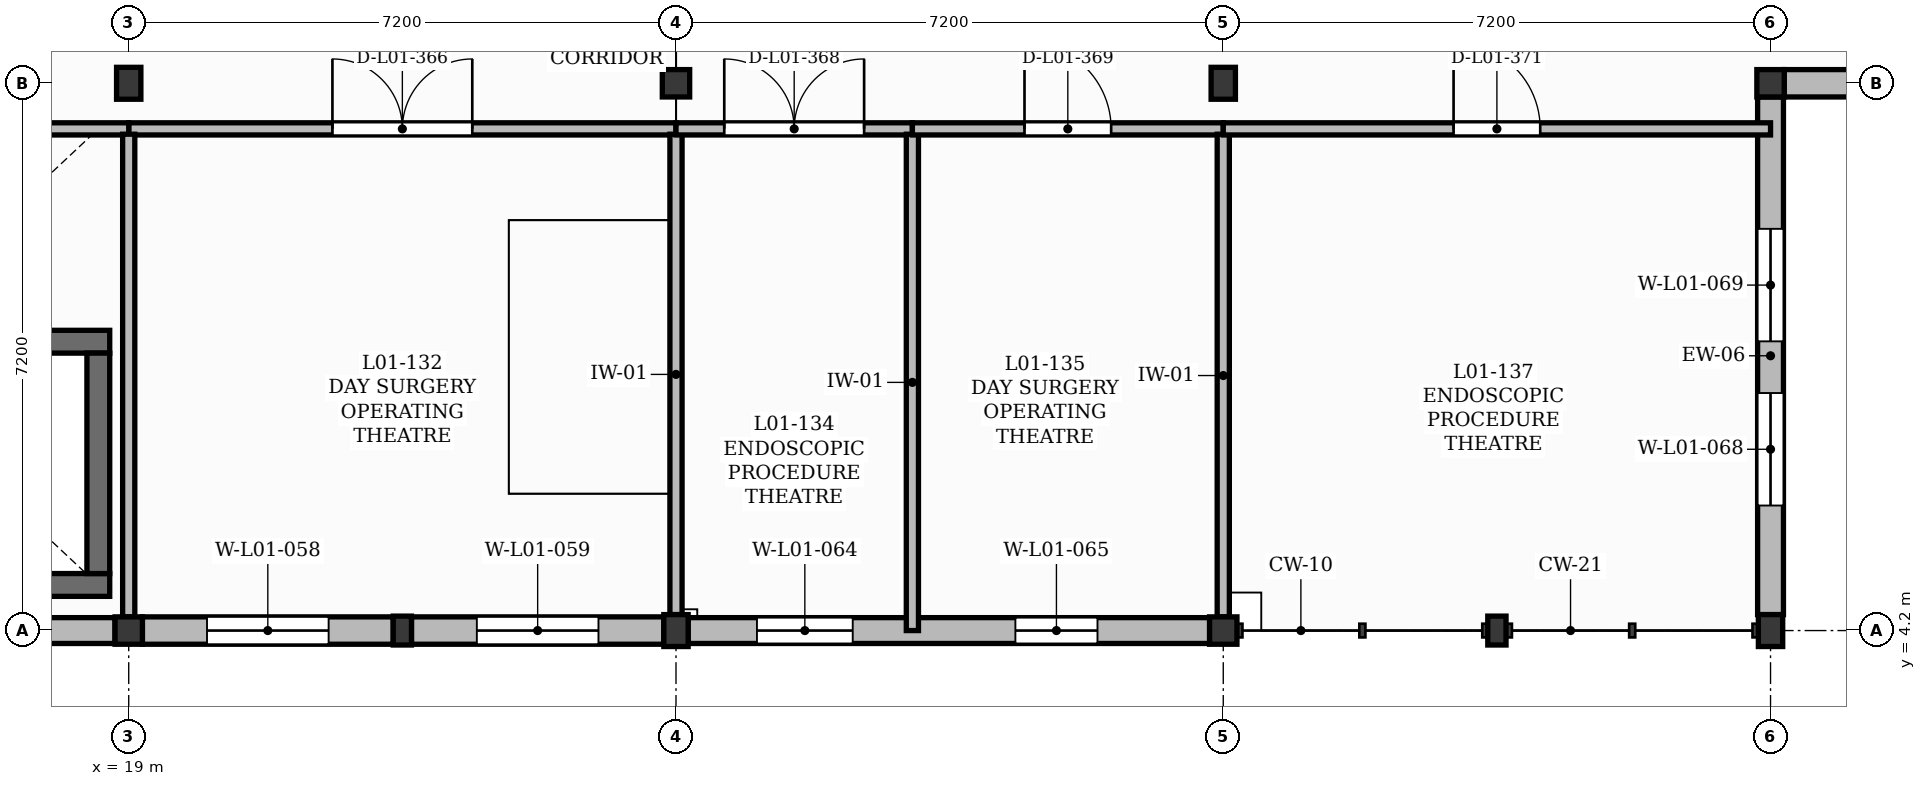
"""IFC4 building model, lengths in metres.
Left out: names, types, materials, properties, quantities, classifications, styles, units other than length and angle.
Written with IfcOpenShell. Run it as: python <this file> out.ifc"""

import sys

from ifc_helpers import new_model, si_unit, direction, frame, frame_2d, origin, origin_2d, place, context, subcontext, project, spatial, rectangle, extrude, element, fill, save


model = new_model("IFC4")
c1 = context("Model", 3, precision=1e-05, world=origin(), true_north=direction((0.0, 1.0)))
c2 = subcontext(c1, "Body", "Model", "MODEL_VIEW")
j1 = project(units=[si_unit("LENGTHUNIT", "METRE"), si_unit("PLANEANGLEUNIT", "RADIAN")], contexts=[c1])
p1 = place(None, origin())
s1 = spatial("IfcSite", under=j1, at=p1, CompositionType="ELEMENT")
p2 = place(p1, origin())
s2 = spatial("IfcBuilding", under=s1, at=p2, CompositionType="ELEMENT")
p3 = place(p2, frame((0.0, 0.0, 4.5)))
s3 = spatial("IfcBuildingStorey", under=s2, at=p3, CompositionType="ELEMENT", Elevation=4.5)
p4 = place(p3, frame((19.0, 4.2, 0.0), z_axis=(0.0, 0.0, 1.0), x_axis=(1.0, 0.0, 0.0)))
e1 = element("IfcColumn", 1, at=p4, inside=s3, PredefinedType="COLUMN", context=c2, shape_type="SweptSolid", body=[
    extrude(rectangle(XDim=0.36, YDim=0.36, at=origin_2d()), origin(), (0.0, 0.0, 1.0), 4.26),
])
for number, where, z_axis, x_axis in (
    (2, (19.0, 11.4, 0.0), (0.0, 0.0, 1.0), (1.0, 0.0, 0.0)),
    (3, (26.2, 4.2, 0.0), (0.0, 0.0, 1.0), (1.0, 0.0, 0.0)),
):
    element("IfcColumn", number, at=place(p3, frame(where, z_axis=z_axis, x_axis=x_axis)), inside=s3, PredefinedType="COLUMN", context=c2, shape_type="SweptSolid", body=[
        extrude(rectangle(XDim=0.32, YDim=0.42, at=origin_2d()), origin(), (0.0, 0.0, 1.0), 4.26),
    ])
for number, where, z_axis, x_axis in (
    (4, (26.2, 11.4, 0.0), (0.0, 0.0, 1.0), (1.0, 0.0, 0.0)),
    (5, (33.4, 4.2, 0.0), (0.0, 0.0, 1.0), (1.0, 0.0, 0.0)),
):
    element("IfcColumn", number, at=place(p3, frame(where, z_axis=z_axis, x_axis=x_axis)), inside=s3, PredefinedType="COLUMN", context=c2, shape_type="SweptSolid", body=[
        extrude(rectangle(XDim=0.36, YDim=0.36, at=origin_2d()), origin(), (0.0, 0.0, 1.0), 4.26),
    ])
for number, where, z_axis, x_axis in (
    (6, (33.4, 11.4, 0.0), (0.0, 0.0, 1.0), (1.0, 0.0, 0.0)),
    (7, (40.6, 4.2, 0.0), (0.0, 0.0, 1.0), (1.0, 0.0, 0.0)),
):
    element("IfcColumn", number, at=place(p3, frame(where, z_axis=z_axis, x_axis=x_axis)), inside=s3, PredefinedType="COLUMN", context=c2, shape_type="SweptSolid", body=[
        extrude(rectangle(XDim=0.32, YDim=0.42, at=origin_2d()), origin(), (0.0, 0.0, 1.0), 4.26),
    ])
p5 = place(p3, frame((40.6, 11.4, 0.0), z_axis=(0.0, 0.0, 1.0), x_axis=(1.0, 0.0, 0.0)))
e8 = element("IfcColumn", 8, at=p5, inside=s3, PredefinedType="COLUMN", context=c2, shape_type="SweptSolid", body=[
    extrude(rectangle(XDim=0.36, YDim=0.36, at=origin_2d()), origin(), (0.0, 0.0, 1.0), 4.26),
])
for number, where, z_axis, x_axis in (
    (9, (22.6, 4.2, 0.0), (0.0, 0.0, 1.0), (1.0, 0.0, 0.0)),
    (10, (37.0, 4.2, 0.0), (0.0, 0.0, 1.0), (1.0, 0.0, 0.0)),
):
    element("IfcColumn", number, at=place(p3, frame(where, z_axis=z_axis, x_axis=x_axis)), inside=s3, PredefinedType="PILASTER", context=c2, shape_type="SweptSolid", body=[
        extrude(rectangle(XDim=0.24, YDim=0.38, at=origin_2d()), origin(), (0.0, 0.0, 1.0), 4.26),
    ])
p6 = place(p3, frame((11.96, 4.2, 0.0), z_axis=(0.0, 0.0, 1.0), x_axis=(1.0, 0.0, 0.0)))
e11 = element("IfcWall", 11, at=p6, inside=s3, PredefinedType="SOLIDWALL", context=c2, shape_type="SweptSolid", body=[
    extrude(rectangle(XDim=6.86, YDim=0.34, at=frame_2d((3.43, 0.0))), origin(), (0.0, 0.0, 1.0), 3.8),
])
p7 = place(p3, frame((19.18, 4.2, 0.0), z_axis=(0.0, 0.0, 1.0), x_axis=(1.0, 0.0, 0.0)))
e12 = element("IfcWall", 12, at=p7, inside=s3, PredefinedType="SOLIDWALL", context=c2, shape_type="SweptSolid", body=[
    extrude(rectangle(XDim=3.3, YDim=0.36, at=frame_2d((1.65, 0.0))), origin(), (0.0, 0.0, 1.0), 3.8),
])
p8 = place(p7, frame((0.85, 0.0, 1.0)))
e13 = element("IfcOpeningElement", 13, at=p8, cuts=e12, PredefinedType="OPENING", context=c2, shape_type="SweptSolid", body=[
    extrude(rectangle(XDim=1.6, YDim=2.2, at=frame_2d((0.8, 1.1))), frame((0.0, 0.19, 0.0), z_axis=(0.0, -1.0, 0.0), x_axis=(1.0, 0.0, 0.0)), (0.0, 0.0, 1.0), 0.38),
])
p9 = place(p3, frame((22.72, 4.2, 0.0), z_axis=(0.0, 0.0, 1.0), x_axis=(1.0, 0.0, 0.0)))
e14 = element("IfcWall", 14, at=p9, inside=s3, PredefinedType="SOLIDWALL", context=c2, shape_type="SweptSolid", body=[
    extrude(rectangle(XDim=3.32, YDim=0.36, at=frame_2d((1.66, 0.0))), origin(), (0.0, 0.0, 1.0), 3.8),
])
p10 = place(p9, frame((0.86, 0.0, 1.0)))
e15 = element("IfcOpeningElement", 15, at=p10, cuts=e14, PredefinedType="OPENING", context=c2, shape_type="SweptSolid", body=[
    extrude(rectangle(XDim=1.6, YDim=2.2, at=frame_2d((0.8, 1.1))), frame((0.0, 0.19, 0.0), z_axis=(0.0, -1.0, 0.0), x_axis=(1.0, 0.0, 0.0)), (0.0, 0.0, 1.0), 0.38),
])
p11 = place(p3, frame((26.36, 4.2, 0.0), z_axis=(0.0, 0.0, 1.0), x_axis=(1.0, 0.0, 0.0)))
e16 = element("IfcWall", 16, at=p11, inside=s3, PredefinedType="SOLIDWALL", context=c2, shape_type="SweptSolid", body=[
    extrude(rectangle(XDim=6.86, YDim=0.34, at=frame_2d((3.43, 0.0))), origin(), (0.0, 0.0, 1.0), 3.8),
])
p12 = place(p11, frame((0.905, 0.0, 1.05)))
e17 = element("IfcOpeningElement", 17, at=p12, cuts=e16, PredefinedType="OPENING", context=c2, shape_type="SweptSolid", body=[
    extrude(rectangle(XDim=1.26, YDim=1.65, at=frame_2d((0.63, 0.825))), frame((0.0, 0.18, 0.0), z_axis=(0.0, -1.0, 0.0), x_axis=(1.0, 0.0, 0.0)), (0.0, 0.0, 1.0), 0.36),
])
p13 = place(p11, frame((4.305, 0.0, 1.0)))
e18 = element("IfcOpeningElement", 18, at=p13, cuts=e16, PredefinedType="OPENING", context=c2, shape_type="SweptSolid", body=[
    extrude(rectangle(XDim=1.08, YDim=1.95, at=frame_2d((0.54, 0.975))), frame((0.0, 0.18, 0.0), z_axis=(0.0, -1.0, 0.0), x_axis=(1.0, 0.0, 0.0)), (0.0, 0.0, 1.0), 0.36),
])
p14 = place(p3, frame((40.6, 4.41, 0.0), z_axis=(0.0, 0.0, 1.0), x_axis=(0.0, 1.0, 0.0)))
e19 = element("IfcWall", 19, at=p14, inside=s3, PredefinedType="SOLIDWALL", context=c2, shape_type="SweptSolid", body=[
    extrude(rectangle(XDim=6.81, YDim=0.34, at=frame_2d((3.405, 0.0))), origin(), (0.0, 0.0, 1.0), 3.8),
])
p15 = place(p14, frame((1.435, 0.0, 1.0)))
e20 = element("IfcOpeningElement", 20, at=p15, cuts=e19, PredefinedType="OPENING", context=c2, shape_type="SweptSolid", body=[
    extrude(rectangle(XDim=1.48, YDim=1.95, at=frame_2d((0.74, 0.975))), frame((0.0, 0.18, 0.0), z_axis=(0.0, -1.0, 0.0), x_axis=(1.0, 0.0, 0.0)), (0.0, 0.0, 1.0), 0.36),
])
p16 = place(p14, frame((3.595, 0.0, 1.0)))
e21 = element("IfcOpeningElement", 21, at=p16, cuts=e19, PredefinedType="OPENING", context=c2, shape_type="SweptSolid", body=[
    extrude(rectangle(XDim=1.48, YDim=1.95, at=frame_2d((0.74, 0.975))), frame((0.0, 0.18, 0.0), z_axis=(0.0, -1.0, 0.0), x_axis=(1.0, 0.0, 0.0)), (0.0, 0.0, 1.0), 0.36),
])
p17 = place(p3, frame((40.78, 11.4, 0.0), z_axis=(0.0, 0.0, 1.0), x_axis=(1.0, 0.0, 0.0)))
e22 = element("IfcWall", 22, at=p17, inside=s3, PredefinedType="SOLIDWALL", context=c2, shape_type="SweptSolid", body=[
    extrude(rectangle(XDim=6.86, YDim=0.36, at=frame_2d((3.43, 0.0))), origin(), (0.0, 0.0, 1.0), 3.8),
])
p18 = place(p17, frame((1.33, 0.0, 1.0)))
e23 = element("IfcOpeningElement", 23, at=p18, cuts=e22, PredefinedType="OPENING", context=c2, shape_type="SweptSolid", body=[
    extrude(rectangle(XDim=1.76, YDim=1.95, at=frame_2d((0.88, 0.975))), frame((0.0, 0.19, 0.0), z_axis=(0.0, -1.0, 0.0), x_axis=(1.0, 0.0, 0.0)), (0.0, 0.0, 1.0), 0.38),
])
p19 = place(p17, frame((3.77, 0.0, 1.0)))
e24 = element("IfcOpeningElement", 24, at=p19, cuts=e22, PredefinedType="OPENING", context=c2, shape_type="SweptSolid", body=[
    extrude(rectangle(XDim=1.76, YDim=1.95, at=frame_2d((0.88, 0.975))), frame((0.0, 0.19, 0.0), z_axis=(0.0, -1.0, 0.0), x_axis=(1.0, 0.0, 0.0)), (0.0, 0.0, 1.0), 0.38),
])
for number, where, z_axis, x_axis in (
    (25, (12.05, 4.8, 0.0), (0.0, 0.0, 1.0), (1.0, 0.0, 0.0)),
    (26, (12.05, 8.0, 0.0), (0.0, 0.0, 1.0), (1.0, 0.0, 0.0)),
):
    element("IfcWall", number, at=place(p3, frame(where, z_axis=z_axis, x_axis=x_axis)), inside=s3, PredefinedType="SHEAR", context=c2, shape_type="SweptSolid", body=[
        extrude(rectangle(XDim=6.7, YDim=0.3, at=frame_2d((3.35, 0.0))), origin(), (0.0, 0.0, 1.0), 4.25),
    ])
p20 = place(p3, frame((18.6, 4.95, 0.0), z_axis=(0.0, 0.0, 1.0), x_axis=(0.0, 1.0, 0.0)))
e27 = element("IfcWall", 27, at=p20, inside=s3, PredefinedType="SHEAR", context=c2, shape_type="SweptSolid", body=[
    extrude(rectangle(XDim=2.9, YDim=0.3, at=frame_2d((1.45, 0.0))), origin(), (0.0, 0.0, 1.0), 4.25),
])
p21 = place(p3, frame((19.0, 10.8, 0.0), z_axis=(0.0, 0.0, 1.0), x_axis=(1.0, 0.0, 0.0)))
e28 = element("IfcWall", 28, at=p21, inside=s3, PredefinedType="PARTITIONING", context=c2, shape_type="SweptSolid", body=[
    extrude(rectangle(XDim=7.2, YDim=0.16, at=frame_2d((3.6, 0.0))), origin(), (0.0, 0.0, 1.0), 4.18),
])
p22 = place(p21, frame((2.68, 0.0, 0.0)))
e29 = element("IfcOpeningElement", 29, at=p22, cuts=e28, PredefinedType="OPENING", context=c2, shape_type="SweptSolid", body=[
    extrude(rectangle(XDim=1.84, YDim=2.35, at=frame_2d((0.92, 1.175))), frame((0.0, 0.09, 0.0), z_axis=(0.0, -1.0, 0.0), x_axis=(1.0, 0.0, 0.0)), (0.0, 0.0, 1.0), 0.18),
])
p23 = place(p3, frame((26.2, 4.41, 0.0), z_axis=(0.0, 0.0, 1.0), x_axis=(0.0, 1.0, 0.0)))
e30 = element("IfcWall", 30, at=p23, inside=s3, PredefinedType="PARTITIONING", context=c2, shape_type="SweptSolid", body=[
    extrude(rectangle(XDim=6.32, YDim=0.16, at=frame_2d((3.16, 0.0))), origin(), (0.0, 0.0, 1.0), 3.74),
])
p24 = place(p3, frame((26.2, 10.8, 0.0), z_axis=(0.0, 0.0, 1.0), x_axis=(1.0, 0.0, 0.0)))
e31 = element("IfcWall", 31, at=p24, inside=s3, PredefinedType="PARTITIONING", context=c2, shape_type="SweptSolid", body=[
    extrude(rectangle(XDim=3.11, YDim=0.16, at=frame_2d((1.555, 0.0))), origin(), (0.0, 0.0, 1.0), 4.18),
])
p25 = place(p24, frame((0.635, 0.0, 0.0)))
e32 = element("IfcOpeningElement", 32, at=p25, cuts=e31, PredefinedType="OPENING", context=c2, shape_type="SweptSolid", body=[
    extrude(rectangle(XDim=1.84, YDim=2.35, at=frame_2d((0.92, 1.175))), frame((0.0, 0.09, 0.0), z_axis=(0.0, -1.0, 0.0), x_axis=(1.0, 0.0, 0.0)), (0.0, 0.0, 1.0), 0.18),
])
p26 = place(p3, frame((29.31, 4.2, 0.0), z_axis=(0.0, 0.0, 1.0), x_axis=(0.0, 1.0, 0.0)))
e33 = element("IfcWall", 33, at=p26, inside=s3, PredefinedType="PARTITIONING", context=c2, shape_type="SweptSolid", body=[
    extrude(rectangle(XDim=6.53, YDim=0.16, at=frame_2d((3.265, 0.0))), origin(), (0.0, 0.0, 1.0), 4.18),
])
p27 = place(p3, frame((29.31, 10.8, 0.0), z_axis=(0.0, 0.0, 1.0), x_axis=(1.0, 0.0, 0.0)))
e34 = element("IfcWall", 34, at=p27, inside=s3, PredefinedType="PARTITIONING", context=c2, shape_type="SweptSolid", body=[
    extrude(rectangle(XDim=4.09, YDim=0.16, at=frame_2d((2.045, 0.0))), origin(), (0.0, 0.0, 1.0), 4.18),
])
p28 = place(p27, frame((1.475, 0.0, 0.0)))
e35 = element("IfcOpeningElement", 35, at=p28, cuts=e34, PredefinedType="OPENING", context=c2, shape_type="SweptSolid", body=[
    extrude(rectangle(XDim=1.14, YDim=2.15, at=frame_2d((0.57, 1.075))), frame((0.0, 0.09, 0.0), z_axis=(0.0, -1.0, 0.0), x_axis=(1.0, 0.0, 0.0)), (0.0, 0.0, 1.0), 0.18),
])
p29 = place(p3, frame((33.4, 4.38, 0.0), z_axis=(0.0, 0.0, 1.0), x_axis=(0.0, 1.0, 0.0)))
e36 = element("IfcWall", 36, at=p29, inside=s3, PredefinedType="PARTITIONING", context=c2, shape_type="SweptSolid", body=[
    extrude(rectangle(XDim=6.35, YDim=0.16, at=frame_2d((3.175, 0.0))), origin(), (0.0, 0.0, 1.0), 3.74),
])
p30 = place(p3, frame((33.4, 10.8, 0.0), z_axis=(0.0, 0.0, 1.0), x_axis=(1.0, 0.0, 0.0)))
e37 = element("IfcWall", 37, at=p30, inside=s3, PredefinedType="PARTITIONING", context=c2, shape_type="SweptSolid", body=[
    extrude(rectangle(XDim=7.2, YDim=0.16, at=frame_2d((3.6, 0.0))), origin(), (0.0, 0.0, 1.0), 4.18),
])
p31 = place(p30, frame((3.03, 0.0, 0.0)))
e38 = element("IfcOpeningElement", 38, at=p31, cuts=e37, PredefinedType="OPENING", context=c2, shape_type="SweptSolid", body=[
    extrude(rectangle(XDim=1.14, YDim=2.15, at=frame_2d((0.57, 1.075))), frame((0.0, 0.09, 0.0), z_axis=(0.0, -1.0, 0.0), x_axis=(1.0, 0.0, 0.0)), (0.0, 0.0, 1.0), 0.18),
])
p32 = place(p3, frame((16.4, 10.8, 0.0), z_axis=(0.0, 0.0, 1.0), x_axis=(1.0, 0.0, 0.0)))
e39 = element("IfcWall", 39, at=p32, inside=s3, PredefinedType="PARTITIONING", context=c2, shape_type="SweptSolid", body=[
    extrude(rectangle(XDim=2.6, YDim=0.16, at=frame_2d((1.3, 0.0))), origin(), (0.0, 0.0, 1.0), 4.18),
])
p33 = place(p3, frame((19.0, 4.38, 0.0), z_axis=(0.0, 0.0, 1.0), x_axis=(0.0, 1.0, 0.0)))
e40 = element("IfcWall", 40, at=p33, inside=s3, PredefinedType="PARTITIONING", context=c2, shape_type="SweptSolid", body=[
    extrude(rectangle(XDim=6.35, YDim=0.16, at=frame_2d((3.175, 0.0))), origin(), (0.0, 0.0, 1.0), 3.74),
])
p34 = place(p8, origin())
e41 = element("IfcWindow", 41, at=p34, inside=s3, PartitioningType="DOUBLE_PANEL_VERTICAL", PredefinedType="WINDOW", context=c2, shape_type="SweptSolid", body=[
    extrude(rectangle(XDim=1.6, YDim=2.2, at=frame_2d((0.8, 1.1))), frame((0.0, 0.03, 0.0), z_axis=(0.0, -1.0, 0.0), x_axis=(1.0, 0.0, 0.0)), (0.0, 0.0, 1.0), 0.06),
])
fill(e13, e41)
p35 = place(p10, origin())
e42 = element("IfcWindow", 42, at=p35, inside=s3, PartitioningType="DOUBLE_PANEL_VERTICAL", PredefinedType="WINDOW", context=c2, shape_type="SweptSolid", body=[
    extrude(rectangle(XDim=1.6, YDim=2.2, at=frame_2d((0.8, 1.1))), frame((0.0, 0.03, 0.0), z_axis=(0.0, -1.0, 0.0), x_axis=(1.0, 0.0, 0.0)), (0.0, 0.0, 1.0), 0.06),
])
fill(e15, e42)
p36 = place(p12, origin())
e43 = element("IfcWindow", 43, at=p36, inside=s3, PartitioningType="SINGLE_PANEL", PredefinedType="WINDOW", context=c2, shape_type="SweptSolid", body=[
    extrude(rectangle(XDim=1.26, YDim=1.65, at=frame_2d((0.63, 0.825))), frame((0.0, 0.03, 0.0), z_axis=(0.0, -1.0, 0.0), x_axis=(1.0, 0.0, 0.0)), (0.0, 0.0, 1.0), 0.06),
])
fill(e17, e43)
p37 = place(p13, origin())
e44 = element("IfcWindow", 44, at=p37, inside=s3, PartitioningType="SINGLE_PANEL", PredefinedType="WINDOW", context=c2, shape_type="SweptSolid", body=[
    extrude(rectangle(XDim=1.08, YDim=1.95, at=frame_2d((0.54, 0.975))), frame((0.0, 0.03, 0.0), z_axis=(0.0, -1.0, 0.0), x_axis=(1.0, 0.0, 0.0)), (0.0, 0.0, 1.0), 0.06),
])
fill(e18, e44)
p38 = place(p15, origin())
e45 = element("IfcWindow", 45, at=p38, inside=s3, PartitioningType="SINGLE_PANEL", PredefinedType="WINDOW", context=c2, shape_type="SweptSolid", body=[
    extrude(rectangle(XDim=1.48, YDim=1.95, at=frame_2d((0.74, 0.975))), frame((0.0, 0.03, 0.0), z_axis=(0.0, -1.0, 0.0), x_axis=(1.0, 0.0, 0.0)), (0.0, 0.0, 1.0), 0.06),
])
fill(e20, e45)
p39 = place(p16, origin())
e46 = element("IfcWindow", 46, at=p39, inside=s3, PartitioningType="SINGLE_PANEL", PredefinedType="WINDOW", context=c2, shape_type="SweptSolid", body=[
    extrude(rectangle(XDim=1.48, YDim=1.95, at=frame_2d((0.74, 0.975))), frame((0.0, 0.03, 0.0), z_axis=(0.0, -1.0, 0.0), x_axis=(1.0, 0.0, 0.0)), (0.0, 0.0, 1.0), 0.06),
])
fill(e21, e46)
p40 = place(p22, origin())
e47 = element("IfcDoor", 47, at=p40, inside=s3, OperationType="DOUBLE_DOOR_SINGLE_SWING", PredefinedType="DOOR", context=c2, shape_type="SweptSolid", body=[
    extrude(rectangle(XDim=1.84, YDim=2.35, at=frame_2d((0.92, 1.175))), frame((0.0, 0.025, 0.0), z_axis=(0.0, -1.0, 0.0), x_axis=(1.0, 0.0, 0.0)), (0.0, 0.0, 1.0), 0.05),
])
fill(e29, e47)
p41 = place(p25, origin())
e48 = element("IfcDoor", 48, at=p41, inside=s3, OperationType="DOUBLE_DOOR_SINGLE_SWING", PredefinedType="DOOR", context=c2, shape_type="SweptSolid", body=[
    extrude(rectangle(XDim=1.84, YDim=2.35, at=frame_2d((0.92, 1.175))), frame((0.0, 0.025, 0.0), z_axis=(0.0, -1.0, 0.0), x_axis=(1.0, 0.0, 0.0)), (0.0, 0.0, 1.0), 0.05),
])
fill(e32, e48)
p42 = place(p28, origin())
e49 = element("IfcDoor", 49, at=p42, inside=s3, OperationType="SINGLE_SWING_LEFT", PredefinedType="DOOR", context=c2, shape_type="SweptSolid", body=[
    extrude(rectangle(XDim=1.14, YDim=2.15, at=frame_2d((0.57, 1.075))), frame((0.0, 0.025, 0.0), z_axis=(0.0, -1.0, 0.0), x_axis=(1.0, 0.0, 0.0)), (0.0, 0.0, 1.0), 0.05),
])
fill(e35, e49)
p43 = place(p31, origin())
e50 = element("IfcDoor", 50, at=p43, inside=s3, OperationType="SINGLE_SWING_LEFT", PredefinedType="DOOR", context=c2, shape_type="SweptSolid", body=[
    extrude(rectangle(XDim=1.14, YDim=2.15, at=frame_2d((0.57, 1.075))), frame((0.0, 0.025, 0.0), z_axis=(0.0, -1.0, 0.0), x_axis=(1.0, 0.0, 0.0)), (0.0, 0.0, 1.0), 0.05),
])
fill(e38, e50)
save(model, sys.argv[1])
